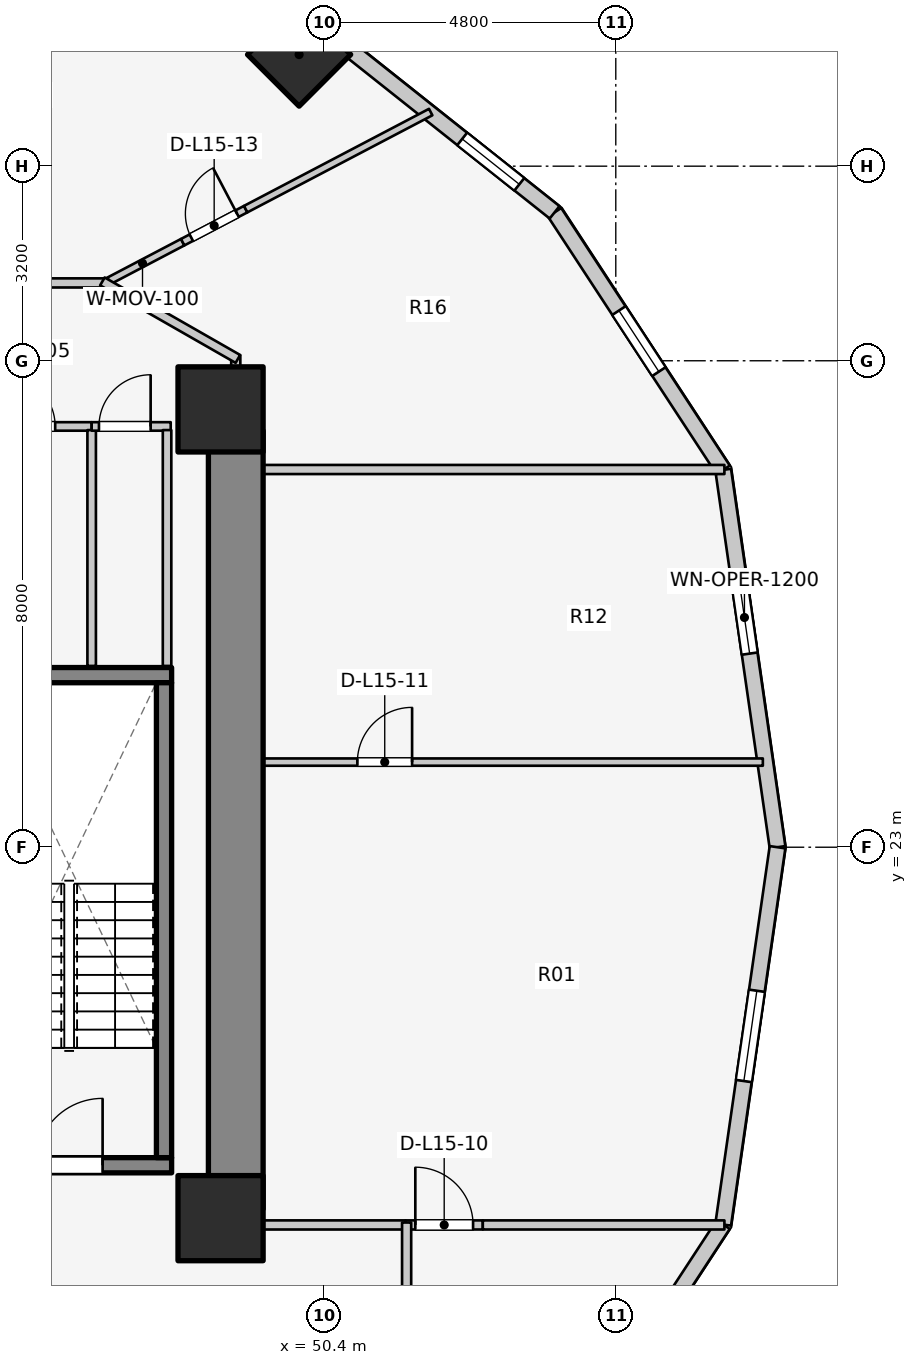
"""IFC4 building model, lengths in metres.
Left out: names, types, materials, properties, quantities, classifications, styles, units other than length and angle.
Written with IfcOpenShell. Run it as: python <this file> out.ifc"""

import sys

from ifc_helpers import new_model, si_unit, direction, frame, frame_2d, origin, origin_2d, place, context, subcontext, project, spatial, rectangle, extrude, element, fill, save


model = new_model("IFC4")
c1 = context("Model", 3, precision=1e-05, world=origin(), true_north=direction((0.0, 1.0)))
c2 = subcontext(c1, "Body", "Model", "MODEL_VIEW")
j1 = project(units=[si_unit("LENGTHUNIT", "METRE"), si_unit("PLANEANGLEUNIT", "RADIAN")], contexts=[c1])
p1 = place(None, origin())
s1 = spatial("IfcSite", under=j1, at=p1, CompositionType="ELEMENT")
p2 = place(p1, origin())
s2 = spatial("IfcBuilding", under=s1, at=p2, CompositionType="ELEMENT")
p3 = place(p2, frame((0.0, 0.0, 52.4)))
s3 = spatial("IfcBuildingStorey", under=s2, at=p3, CompositionType="ELEMENT", Elevation=52.4)
p4 = place(p3, frame((48.95, 17.05, 0.0), z_axis=(0.0, 0.0, 1.0), x_axis=(0.0, 1.0, 0.0)))
e1 = element("IfcWall", 1, at=p4, inside=s3, PredefinedType="SHEAR", context=c2, shape_type="SweptSolid", body=[
    extrude(rectangle(XDim=12.8, YDim=0.9, at=frame_2d((6.4, 0.0))), origin(), (0.0, 0.0, 1.0), 3.1),
])
p5 = place(p3, frame((44.525, 17.77, 0.0), z_axis=(0.0, 0.0, 1.0), x_axis=(1.0, 0.0, 0.0)))
e2 = element("IfcWall", 2, at=p5, inside=s3, PredefinedType="SOLIDWALL", context=c2, shape_type="SweptSolid", body=[
    extrude(rectangle(XDim=3.37, YDim=0.25, at=frame_2d((1.685, 0.0))), origin(), (0.0, 0.0, 1.0), 3.1),
])
p6 = place(p5, frame((1.135, 0.0, 0.0)))
e3 = element("IfcOpeningElement", 3, at=p6, cuts=e2, PredefinedType="OPENING", context=c2, shape_type="SweptSolid", body=[
    extrude(rectangle(XDim=1.1, YDim=2.1, at=frame_2d((0.55, 1.05))), frame((0.0, 0.135, 0.0), z_axis=(0.0, -1.0, 0.0), x_axis=(1.0, 0.0, 0.0)), (0.0, 0.0, 1.0), 0.27),
])
p7 = place(p3, frame((44.525, 25.83, 0.0), z_axis=(0.0, 0.0, 1.0), x_axis=(1.0, 0.0, 0.0)))
e4 = element("IfcWall", 4, at=p7, inside=s3, PredefinedType="SOLIDWALL", context=c2, shape_type="SweptSolid", body=[
    extrude(rectangle(XDim=3.37, YDim=0.25, at=frame_2d((1.685, 0.0))), origin(), (0.0, 0.0, 1.0), 3.1),
])
p8 = place(p3, frame((47.77, 17.895, 0.0), z_axis=(0.0, 0.0, 1.0), x_axis=(0.0, 1.0, 0.0)))
e5 = element("IfcWall", 5, at=p8, inside=s3, PredefinedType="SOLIDWALL", context=c2, shape_type="SweptSolid", body=[
    extrude(rectangle(XDim=7.81, YDim=0.25, at=frame_2d((3.905, 0.0))), origin(), (0.0, 0.0, 1.0), 3.1),
])
for number, where, z_axis, x_axis in (
    (6, (48.7, 16.9, 0.0), (0.0, 0.0, 1.0), (1.0, 0.0, 0.0)),
    (7, (48.7, 30.2, 0.0), (0.0, 0.0, 1.0), (1.0, 0.0, 0.0)),
):
    element("IfcColumn", number, at=place(p3, frame(where, z_axis=z_axis, x_axis=x_axis)), inside=s3, PredefinedType="COLUMN", context=c2, shape_type="SweptSolid", body=[
        extrude(rectangle(XDim=1.4, YDim=1.4, at=origin_2d()), origin(), (0.0, 0.0, 1.0), 3.1),
    ])
p9 = place(p3, frame((49.992, 36.035, 0.0), z_axis=(0.0, 0.0, 1.0), x_axis=(0.707106781187, 0.707106781187, 0.0)))
e8 = element("IfcColumn", 8, at=p9, inside=s3, PredefinedType="COLUMN", context=c2, shape_type="SweptSolid", body=[
    extrude(rectangle(XDim=1.2, YDim=1.2, at=origin_2d()), origin(), (0.0, 0.0, 1.0), 3.1),
])
p10 = place(p3, frame((57.86, 23.0, 0.0), z_axis=(0.0, 0.0, 1.0), x_axis=(-0.142528001686, 0.989790770181, 0.0)))
e9 = element("IfcWall", 9, at=p10, inside=s3, PredefinedType="STANDARD", context=c2, shape_type="SweptSolid", body=[
    extrude(rectangle(XDim=6.269, YDim=0.26, at=frame_2d((3.135, 0.0))), origin(), (0.0, 0.0, 1.0), 2.57),
])
p11 = place(p10, frame((3.217, 0.0, 0.75)))
e10 = element("IfcOpeningElement", 10, at=p11, cuts=e9, PredefinedType="OPENING", context=c2, shape_type="SweptSolid", body=[
    extrude(rectangle(XDim=1.2, YDim=1.5, at=frame_2d((0.6, 0.75))), frame((0.0, 0.14, 0.0), z_axis=(0.0, -1.0, 0.0), x_axis=(1.0, 0.0, 0.0)), (0.0, 0.0, 1.0), 0.28),
])
p12 = place(p3, frame((56.967, 29.205, 0.0), z_axis=(0.0, 0.0, 1.0), x_axis=(-0.547702757047, 0.836672988642, 0.0)))
e11 = element("IfcWall", 11, at=p12, inside=s3, PredefinedType="STANDARD", context=c2, shape_type="SweptSolid", body=[
    extrude(rectangle(XDim=5.062, YDim=0.26, at=frame_2d((2.531, 0.0))), origin(), (0.0, 0.0, 1.0), 1.22),
])
p13 = place(p12, frame((1.931, 0.0, 0.15)))
e12 = element("IfcOpeningElement", 12, at=p13, cuts=e11, PredefinedType="OPENING", context=c2, shape_type="SweptSolid", body=[
    extrude(rectangle(XDim=1.2, YDim=0.9, at=frame_2d((0.6, 0.45))), frame((0.0, 0.14, 0.0), z_axis=(0.0, -1.0, 0.0), x_axis=(1.0, 0.0, 0.0)), (0.0, 0.0, 1.0), 0.28),
])
p14 = place(p3, frame((54.194, 33.441, 0.0), z_axis=(0.0, 0.0, 1.0), x_axis=(-0.783123133379, 0.621866672179, 0.0)))
e13 = element("IfcWall", 13, at=p14, inside=s3, PredefinedType="STANDARD", context=c2, shape_type="SweptSolid", body=[
    extrude(rectangle(XDim=4.839, YDim=0.26, at=frame_2d((2.419, 0.0))), origin(), (0.0, 0.0, 1.0), 1.22),
])
p15 = place(p14, frame((0.741, 0.0, 0.15)))
e14 = element("IfcOpeningElement", 14, at=p15, cuts=e13, PredefinedType="OPENING", context=c2, shape_type="SweptSolid", body=[
    extrude(rectangle(XDim=1.2, YDim=0.9, at=frame_2d((0.6, 0.45))), frame((0.0, 0.14, 0.0), z_axis=(0.0, -1.0, 0.0), x_axis=(1.0, 0.0, 0.0)), (0.0, 0.0, 1.0), 0.28),
])
p16 = place(p3, frame((54.194, 12.559, 0.0), z_axis=(0.0, 0.0, 1.0), x_axis=(0.547702757047, 0.836672988642, 0.0)))
e15 = element("IfcWall", 15, at=p16, inside=s3, PredefinedType="STANDARD", context=c2, shape_type="SweptSolid", body=[
    extrude(rectangle(XDim=5.062, YDim=0.26, at=frame_2d((2.531, 0.0))), origin(), (0.0, 0.0, 1.0), 1.22),
])
p17 = place(p16, frame((1.931, 0.0, 0.15)))
e16 = element("IfcOpeningElement", 16, at=p17, cuts=e15, PredefinedType="OPENING", context=c2, shape_type="SweptSolid", body=[
    extrude(rectangle(XDim=1.2, YDim=0.9, at=frame_2d((0.6, 0.45))), frame((0.0, 0.14, 0.0), z_axis=(0.0, -1.0, 0.0), x_axis=(1.0, 0.0, 0.0)), (0.0, 0.0, 1.0), 0.28),
])
p18 = place(p3, frame((56.967, 16.795, 0.0), z_axis=(0.0, 0.0, 1.0), x_axis=(0.142528001686, 0.989790770181, 0.0)))
e17 = element("IfcWall", 17, at=p18, inside=s3, PredefinedType="STANDARD", context=c2, shape_type="SweptSolid", body=[
    extrude(rectangle(XDim=6.269, YDim=0.26, at=frame_2d((3.135, 0.0))), origin(), (0.0, 0.0, 1.0), 2.57),
])
p19 = place(p18, frame((2.385, 0.0, 0.75)))
e18 = element("IfcOpeningElement", 18, at=p19, cuts=e17, PredefinedType="OPENING", context=c2, shape_type="SweptSolid", body=[
    extrude(rectangle(XDim=1.5, YDim=1.6, at=frame_2d((0.75, 0.8))), frame((0.0, 0.14, 0.0), z_axis=(0.0, -1.0, 0.0), x_axis=(1.0, 0.0, 0.0)), (0.0, 0.0, 1.0), 0.28),
])
p20 = place(p3, frame((44.58, 29.92, 0.0), z_axis=(0.0, 0.0, 1.0), x_axis=(1.0, 0.0, 0.0)))
e19 = element("IfcWall", 19, at=p20, inside=s3, PredefinedType="PLUMBINGWALL", context=c2, shape_type="SweptSolid", body=[
    extrude(rectangle(XDim=2.0, YDim=0.14, at=frame_2d((1.0, 0.0))), origin(), (0.0, 0.0, 1.0), 2.575),
])
p21 = place(p20, frame((0.55, 0.0, 0.0)))
e20 = element("IfcOpeningElement", 20, at=p21, cuts=e19, PredefinedType="OPENING", context=c2, shape_type="SweptSolid", body=[
    extrude(rectangle(XDim=0.85, YDim=2.05, at=frame_2d((0.425, 1.025))), frame((0.0, 0.08, 0.0), z_axis=(0.0, -1.0, 0.0), x_axis=(1.0, 0.0, 0.0)), (0.0, 0.0, 1.0), 0.16),
])
p22 = place(p3, frame((46.58, 25.98, 0.0), z_axis=(0.0, 0.0, 1.0), x_axis=(0.0, 1.0, 0.0)))
e21 = element("IfcWall", 21, at=p22, inside=s3, PredefinedType="PLUMBINGWALL", context=c2, shape_type="SweptSolid", body=[
    extrude(rectangle(XDim=3.88, YDim=0.14, at=frame_2d((1.94, 0.0))), origin(), (0.0, 0.0, 1.0), 2.575),
])
p23 = place(p3, frame((46.58, 29.92, 0.0), z_axis=(0.0, 0.0, 1.0), x_axis=(1.0, 0.0, 0.0)))
e22 = element("IfcWall", 22, at=p23, inside=s3, PredefinedType="PLUMBINGWALL", context=c2, shape_type="SweptSolid", body=[
    extrude(rectangle(XDim=1.3, YDim=0.14, at=frame_2d((0.65, 0.0))), origin(), (0.0, 0.0, 1.0), 2.575),
])
p24 = place(p23, frame((0.12, 0.0, 0.0)))
e23 = element("IfcOpeningElement", 23, at=p24, cuts=e22, PredefinedType="OPENING", context=c2, shape_type="SweptSolid", body=[
    extrude(rectangle(XDim=0.85, YDim=2.05, at=frame_2d((0.425, 1.025))), frame((0.0, 0.08, 0.0), z_axis=(0.0, -1.0, 0.0), x_axis=(1.0, 0.0, 0.0)), (0.0, 0.0, 1.0), 0.16),
])
p25 = place(p3, frame((47.82, 25.98, 0.0), z_axis=(0.0, 0.0, 1.0), x_axis=(0.0, 1.0, 0.0)))
e24 = element("IfcWall", 24, at=p25, inside=s3, PredefinedType="PLUMBINGWALL", context=c2, shape_type="SweptSolid", body=[
    extrude(rectangle(XDim=3.88, YDim=0.14, at=frame_2d((1.94, 0.0))), origin(), (0.0, 0.0, 1.0), 2.575),
])
p26 = place(p3, frame((48.95, 16.788, 0.0), z_axis=(0.0, 0.0, 1.0), x_axis=(1.0, 0.0, 0.0)))
e25 = element("IfcWall", 25, at=p26, inside=s3, PredefinedType="PARTITIONING", context=c2, shape_type="SweptSolid", body=[
    extrude(rectangle(XDim=2.793, YDim=0.15, at=frame_2d((1.396, 0.0))), origin(), (0.0, 0.0, 1.0), 1.22),
])
p27 = place(p3, frame((51.743, 16.788, 0.0), z_axis=(0.0, 0.0, 1.0), x_axis=(1.0, 0.0, 0.0)))
e26 = element("IfcWall", 26, at=p27, inside=s3, PredefinedType="PARTITIONING", context=c2, shape_type="SweptSolid", body=[
    extrude(rectangle(XDim=1.27, YDim=0.15, at=frame_2d((0.635, 0.0))), origin(), (0.0, 0.0, 1.0), 2.575),
])
p28 = place(p27, frame((0.16, 0.0, 0.0)))
e27 = element("IfcOpeningElement", 27, at=p28, cuts=e26, PredefinedType="OPENING", context=c2, shape_type="SweptSolid", body=[
    extrude(rectangle(XDim=0.95, YDim=2.1, at=frame_2d((0.475, 1.05))), frame((0.0, 0.085, 0.0), z_axis=(0.0, -1.0, 0.0), x_axis=(1.0, 0.0, 0.0)), (0.0, 0.0, 1.0), 0.17),
])
p29 = place(p3, frame((53.013, 16.788, 0.0), z_axis=(0.0, 0.0, 1.0), x_axis=(1.0, 0.0, 0.0)))
e28 = element("IfcWall", 28, at=p29, inside=s3, PredefinedType="PARTITIONING", context=c2, shape_type="SweptSolid", body=[
    extrude(rectangle(XDim=3.973, YDim=0.15, at=frame_2d((1.987, 0.0))), origin(), (0.0, 0.0, 1.0), 2.575),
])
p30 = place(p3, frame((48.95, 29.212, 0.0), z_axis=(0.0, 0.0, 1.0), x_axis=(1.0, 0.0, 0.0)))
e29 = element("IfcWall", 29, at=p30, inside=s3, PredefinedType="PARTITIONING", context=c2, shape_type="SweptSolid", body=[
    extrude(rectangle(XDim=8.036, YDim=0.15, at=frame_2d((4.018, 0.0))), origin(), (0.0, 0.0, 1.0), 2.575),
])
p31 = place(p3, frame((48.95, 24.4, 0.0), z_axis=(0.0, 0.0, 1.0), x_axis=(1.0, 0.0, 0.0)))
e30 = element("IfcWall", 30, at=p31, inside=s3, PredefinedType="MOVABLE", context=c2, shape_type="SweptSolid", body=[
    extrude(rectangle(XDim=8.669, YDim=0.12, at=frame_2d((4.334, 0.0))), origin(), (0.0, 0.0, 1.0), 2.575),
])
p32 = place(p31, frame((2.0, 0.0, 0.0)))
e31 = element("IfcOpeningElement", 31, at=p32, cuts=e30, PredefinedType="OPENING", context=c2, shape_type="SweptSolid", body=[
    extrude(rectangle(XDim=0.9, YDim=2.1, at=frame_2d((0.45, 1.05))), frame((0.0, 0.07, 0.0), z_axis=(0.0, -1.0, 0.0), x_axis=(1.0, 0.0, 0.0)), (0.0, 0.0, 1.0), 0.14),
])
p33 = place(p3, frame((48.95, 29.8, 0.0), z_axis=(0.0, 0.0, 1.0), x_axis=(0.0, 1.0, 0.0)))
e32 = element("IfcWall", 32, at=p33, inside=s3, PredefinedType="PARTITIONING", context=c2, shape_type="SweptSolid", body=[
    extrude(rectangle(XDim=1.29, YDim=0.15, at=frame_2d((0.645, 0.0))), origin(), (0.0, 0.0, 1.0), 1.22),
])
p34 = place(p3, frame((46.756, 32.257, 0.0), z_axis=(0.0, 0.0, 1.0), x_axis=(0.885552742751, 0.464538846391, 0.0)))
e33 = element("IfcWall", 33, at=p34, inside=s3, PredefinedType="MOVABLE", context=c2, shape_type="SweptSolid", body=[
    extrude(rectangle(XDim=1.492, YDim=0.12, at=frame_2d((0.746, 0.0))), origin(), (0.0, 0.0, 1.0), 2.575),
])
p35 = place(p3, frame((48.077, 32.95, 0.0), z_axis=(0.0, 0.0, 1.0), x_axis=(0.885533150024, 0.464576194191, 0.0)))
e34 = element("IfcWall", 34, at=p35, inside=s3, PredefinedType="MOVABLE", context=c2, shape_type="SweptSolid", body=[
    extrude(rectangle(XDim=1.17, YDim=0.12, at=frame_2d((0.585, 0.0))), origin(), (0.0, 0.0, 1.0), 2.11),
])
p36 = place(p35, frame((0.16, 0.0, 0.0)))
e35 = element("IfcOpeningElement", 35, at=p36, cuts=e34, PredefinedType="OPENING", context=c2, shape_type="SweptSolid", body=[
    extrude(rectangle(XDim=0.85, YDim=2.05, at=frame_2d((0.425, 1.025))), frame((0.0, 0.07, 0.0), z_axis=(0.0, -1.0, 0.0), x_axis=(1.0, 0.0, 0.0)), (0.0, 0.0, 1.0), 0.14),
])
p37 = place(p3, frame((49.113, 33.493, 0.0), z_axis=(0.0, 0.0, 1.0), x_axis=(0.885561599533, 0.464521962271, 0.0)))
e36 = element("IfcWall", 36, at=p37, inside=s3, PredefinedType="MOVABLE", context=c2, shape_type="SweptSolid", body=[
    extrude(rectangle(XDim=3.436, YDim=0.12, at=frame_2d((1.718, 0.0))), origin(), (0.0, 0.0, 1.0), 1.22),
])
p38 = place(p3, frame((45.61, 32.28, 0.0), z_axis=(0.0, 0.0, 1.0), x_axis=(1.0, 0.0, 0.0)))
e37 = element("IfcWall", 37, at=p38, inside=s3, PredefinedType="PARTITIONING", context=c2, shape_type="SweptSolid", body=[
    extrude(rectangle(XDim=1.24, YDim=0.15, at=frame_2d((0.62, 0.0))), origin(), (0.0, 0.0, 1.0), 2.575),
])
p39 = place(p3, frame((46.757, 32.305, 0.0), z_axis=(0.0, 0.0, 1.0), x_axis=(0.867991349648, -0.496579315857, 0.0)))
e38 = element("IfcWall", 38, at=p39, inside=s3, PredefinedType="PARTITIONING", context=c2, shape_type="SweptSolid", body=[
    extrude(rectangle(XDim=2.567, YDim=0.15, at=frame_2d((1.283, 0.0))), origin(), (0.0, 0.0, 1.0), 1.22),
])
p40 = place(p3, frame((51.76, 13.68, 0.0), z_axis=(0.0, 0.0, 1.0), x_axis=(0.0, 1.0, 0.0)))
e39 = element("IfcWall", 39, at=p40, inside=s3, PredefinedType="PARTITIONING", context=c2, shape_type="SweptSolid", body=[
    extrude(rectangle(XDim=3.148, YDim=0.15, at=frame_2d((1.574, 0.0))), origin(), (0.0, 0.0, 1.0), 2.575),
])
p41 = place(p11, origin())
e40 = element("IfcWindow", 40, at=p41, inside=s3, PartitioningType="SINGLE_PANEL", PredefinedType="WINDOW", context=c2, shape_type="SweptSolid", body=[
    extrude(rectangle(XDim=1.2, YDim=1.5, at=frame_2d((0.6, 0.75))), frame((0.0, 0.03, 0.0), z_axis=(0.0, -1.0, 0.0), x_axis=(1.0, 0.0, 0.0)), (0.0, 0.0, 1.0), 0.06),
])
fill(e10, e40)
p42 = place(p13, origin())
e41 = element("IfcWindow", 41, at=p42, inside=s3, PartitioningType="SINGLE_PANEL", PredefinedType="WINDOW", context=c2, shape_type="SweptSolid", body=[
    extrude(rectangle(XDim=1.2, YDim=0.9, at=frame_2d((0.6, 0.45))), frame((0.0, 0.03, 0.0), z_axis=(0.0, -1.0, 0.0), x_axis=(1.0, 0.0, 0.0)), (0.0, 0.0, 1.0), 0.06),
])
fill(e12, e41)
p43 = place(p15, origin())
e42 = element("IfcWindow", 42, at=p43, inside=s3, PartitioningType="SINGLE_PANEL", PredefinedType="WINDOW", context=c2, shape_type="SweptSolid", body=[
    extrude(rectangle(XDim=1.2, YDim=0.9, at=frame_2d((0.6, 0.45))), frame((0.0, 0.03, 0.0), z_axis=(0.0, -1.0, 0.0), x_axis=(1.0, 0.0, 0.0)), (0.0, 0.0, 1.0), 0.06),
])
fill(e14, e42)
p44 = place(p19, origin())
e43 = element("IfcWindow", 43, at=p44, inside=s3, PartitioningType="SINGLE_PANEL", PredefinedType="WINDOW", context=c2, shape_type="SweptSolid", body=[
    extrude(rectangle(XDim=1.5, YDim=1.6, at=frame_2d((0.75, 0.8))), frame((0.0, 0.03, 0.0), z_axis=(0.0, -1.0, 0.0), x_axis=(1.0, 0.0, 0.0)), (0.0, 0.0, 1.0), 0.06),
])
fill(e18, e43)
p45 = place(p6, origin())
e44 = element("IfcDoor", 44, at=p45, inside=s3, OperationType="SINGLE_SWING_RIGHT", PredefinedType="DOOR", context=c2, shape_type="SweptSolid", body=[
    extrude(rectangle(XDim=1.1, YDim=2.1, at=frame_2d((0.55, 1.05))), frame((0.0, 0.025, 0.0), z_axis=(0.0, -1.0, 0.0), x_axis=(1.0, 0.0, 0.0)), (0.0, 0.0, 1.0), 0.05),
])
fill(e3, e44)
p46 = place(p21, origin())
e45 = element("IfcDoor", 45, at=p46, inside=s3, OperationType="SINGLE_SWING_LEFT", PredefinedType="DOOR", context=c2, shape_type="SweptSolid", body=[
    extrude(rectangle(XDim=0.85, YDim=2.05, at=frame_2d((0.425, 1.025))), frame((0.0, 0.025, 0.0), z_axis=(0.0, -1.0, 0.0), x_axis=(1.0, 0.0, 0.0)), (0.0, 0.0, 1.0), 0.05),
])
fill(e20, e45)
p47 = place(p24, origin())
e46 = element("IfcDoor", 46, at=p47, inside=s3, OperationType="SINGLE_SWING_RIGHT", PredefinedType="DOOR", context=c2, shape_type="SweptSolid", body=[
    extrude(rectangle(XDim=0.85, YDim=2.05, at=frame_2d((0.425, 1.025))), frame((0.0, 0.025, 0.0), z_axis=(0.0, -1.0, 0.0), x_axis=(1.0, 0.0, 0.0)), (0.0, 0.0, 1.0), 0.05),
])
fill(e23, e46)
p48 = place(p28, origin())
e47 = element("IfcDoor", 47, at=p48, inside=s3, OperationType="SINGLE_SWING_LEFT", PredefinedType="DOOR", context=c2, shape_type="SweptSolid", body=[
    extrude(rectangle(XDim=0.95, YDim=2.1, at=frame_2d((0.475, 1.05))), frame((0.0, 0.025, 0.0), z_axis=(0.0, -1.0, 0.0), x_axis=(1.0, 0.0, 0.0)), (0.0, 0.0, 1.0), 0.05),
])
fill(e27, e47)
p49 = place(p32, origin())
e48 = element("IfcDoor", 48, at=p49, inside=s3, OperationType="SINGLE_SWING_RIGHT", PredefinedType="DOOR", context=c2, shape_type="SweptSolid", body=[
    extrude(rectangle(XDim=0.9, YDim=2.1, at=frame_2d((0.45, 1.05))), frame((0.0, 0.025, 0.0), z_axis=(0.0, -1.0, 0.0), x_axis=(1.0, 0.0, 0.0)), (0.0, 0.0, 1.0), 0.05),
])
fill(e31, e48)
p50 = place(p36, origin())
e49 = element("IfcDoor", 49, at=p50, inside=s3, OperationType="SINGLE_SWING_RIGHT", PredefinedType="DOOR", context=c2, shape_type="SweptSolid", body=[
    extrude(rectangle(XDim=0.85, YDim=2.05, at=frame_2d((0.425, 1.025))), frame((0.0, 0.025, 0.0), z_axis=(0.0, -1.0, 0.0), x_axis=(1.0, 0.0, 0.0)), (0.0, 0.0, 1.0), 0.05),
])
fill(e35, e49)
save(model, sys.argv[1])
